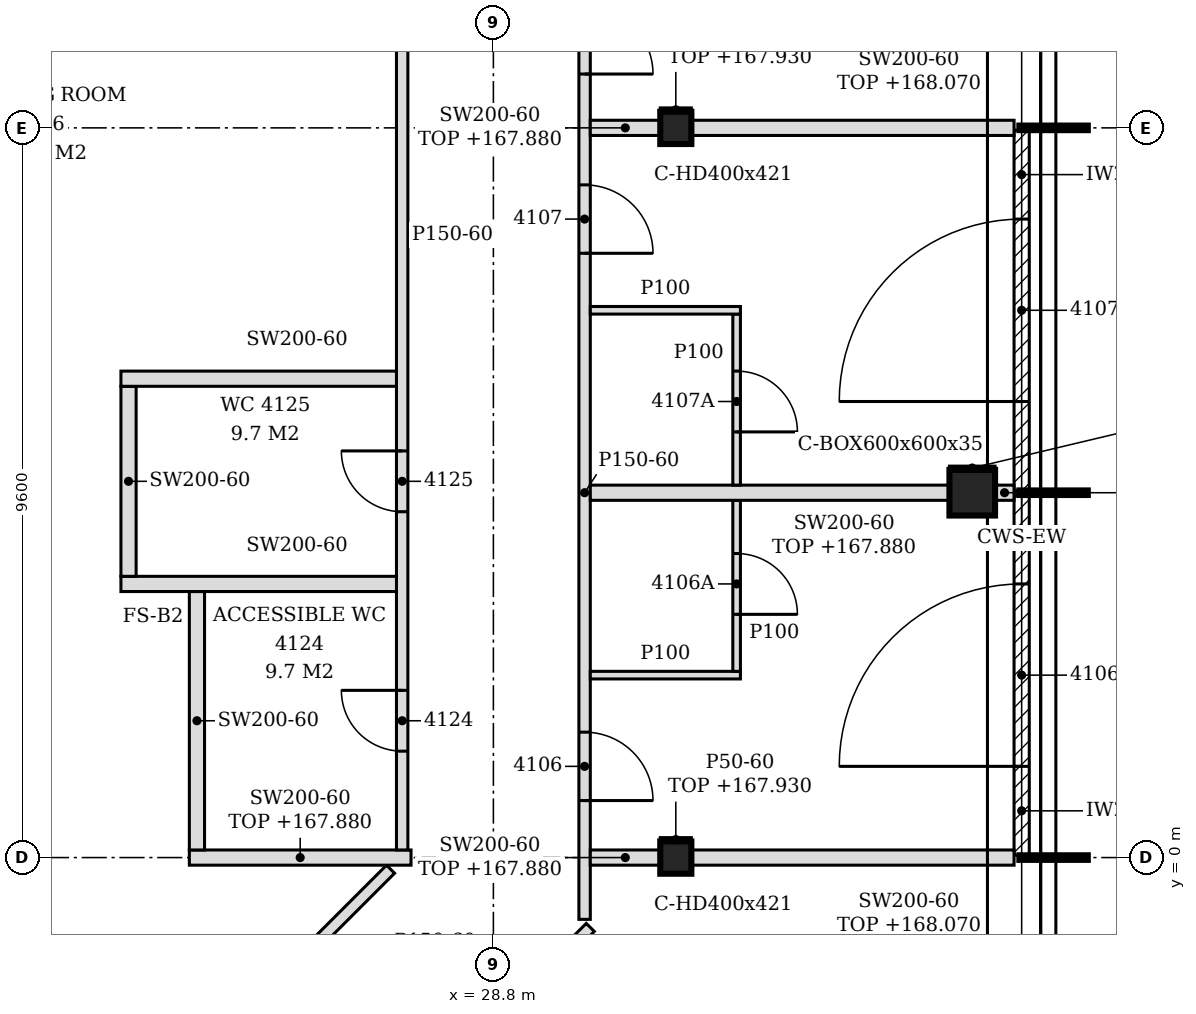
"""IFC4 building model, lengths in metres.
Left out: names, types, materials, properties, quantities, classifications, styles, units other than length and angle.
Written with IfcOpenShell. Run it as: python <this file> out.ifc"""

import sys

from ifc_helpers import new_model, si_unit, direction, frame, frame_2d, origin, origin_2d, place, context, subcontext, project, spatial, polyline, rectangle, hollow_rectangle, i_section, outline, extrude, element, fill, save


model = new_model("IFC4")
c1 = context("Model", 3, precision=1e-05, world=origin(), true_north=direction((0.0, 1.0)))
c2 = subcontext(c1, "Body", "Model", "MODEL_VIEW")
j1 = project(units=[si_unit("LENGTHUNIT", "METRE"), si_unit("PLANEANGLEUNIT", "RADIAN")], contexts=[c1])
p1 = place(None, origin())
s1 = spatial("IfcSite", under=j1, at=p1, CompositionType="ELEMENT")
p2 = place(p1, origin())
s2 = spatial("IfcBuilding", under=s1, at=p2, CompositionType="ELEMENT")
p3 = place(p2, frame((0.0, 0.0, 165.0)))
s3 = spatial("IfcBuildingStorey", under=s2, at=p3, CompositionType="ELEMENT", Elevation=165.0)
p4 = place(p3, frame((35.1, 4.8, -0.15), z_axis=(0.0, 0.0, 1.0), x_axis=(1.0, 0.0, 0.0)))
e1 = element("IfcColumn", 1, at=p4, inside=s3, PredefinedType="COLUMN", context=c2, shape_type="SweptSolid", body=[
    extrude(hollow_rectangle(XDim=0.6, YDim=0.6, WallThickness=0.035, at=origin_2d()), origin(), (0.0, 0.0, 1.0), 3.6),
])
for number, where, z_axis, x_axis in (
    (2, (31.2, 0.0, -0.15), (0.0, 0.0, 1.0), (1.0, 0.0, 0.0)),
    (3, (31.2, 9.6, -0.15), (0.0, 0.0, 1.0), (1.0, 0.0, 0.0)),
):
    element("IfcColumn", number, at=place(p3, frame(where, z_axis=z_axis, x_axis=x_axis)), inside=s3, PredefinedType="COLUMN", context=c2, shape_type="SweptSolid", body=[
        extrude(i_section(OverallWidth=0.409, OverallDepth=0.425, WebThickness=0.033, FlangeThickness=0.052, FilletRadius=0.015, at=origin_2d()), origin(), (0.0, 0.0, 1.0), 3.6),
    ])
p5 = place(p3, frame((35.75, 0.03, 0.0), z_axis=(0.0, 0.0, 1.0), x_axis=(0.0, 1.0, 0.0)))
e4 = element("IfcWall", 4, at=p5, inside=s3, PredefinedType="NOTDEFINED", context=c2, shape_type="SweptSolid", body=[
    extrude(rectangle(XDim=4.74, YDim=0.2, at=frame_2d((2.37, 0.0))), origin(), (0.0, 0.0, 1.0), 3.45),
])
p6 = place(p5, frame((1.17, 0.0, 0.0)))
e5 = element("IfcOpeningElement", 5, at=p6, cuts=e4, PredefinedType="OPENING", context=c2, shape_type="SweptSolid", body=[
    extrude(rectangle(XDim=2.4, YDim=2.4, at=frame_2d((1.2, 1.2))), frame((0.0, 0.11, 0.0), z_axis=(0.0, -1.0, 0.0), x_axis=(1.0, 0.0, 0.0)), (0.0, 0.0, 1.0), 0.22),
])
p7 = place(p3, frame((35.75, 4.83, 0.0), z_axis=(0.0, 0.0, 1.0), x_axis=(0.0, 1.0, 0.0)))
e6 = element("IfcWall", 6, at=p7, inside=s3, PredefinedType="NOTDEFINED", context=c2, shape_type="SweptSolid", body=[
    extrude(rectangle(XDim=4.74, YDim=0.2, at=frame_2d((2.37, 0.0))), origin(), (0.0, 0.0, 1.0), 3.45),
])
p8 = place(p7, frame((1.17, 0.0, 0.0)))
e7 = element("IfcOpeningElement", 7, at=p8, cuts=e6, PredefinedType="OPENING", context=c2, shape_type="SweptSolid", body=[
    extrude(rectangle(XDim=2.4, YDim=2.4, at=frame_2d((1.2, 1.2))), frame((0.0, 0.11, 0.0), z_axis=(0.0, -1.0, 0.0), x_axis=(1.0, 0.0, 0.0)), (0.0, 0.0, 1.0), 0.22),
])
p9 = place(p3, frame((22.722, -8.272, 0.0), z_axis=(0.0, 0.0, 1.0), x_axis=(0.707106781187, 0.707106781187, 0.0)))
e8 = element("IfcWall", 8, at=p9, inside=s3, PredefinedType="PARTITIONING", context=c2, shape_type="SweptSolid", body=[
    extrude(rectangle(XDim=10.399, YDim=0.15, at=frame_2d((5.199, 0.0))), origin(), (0.0, 0.0, 1.0), 2.88),
])
p10 = place(p9, frame((2.846, 0.0, 0.0)))
e9 = element("IfcOpeningElement", 9, at=p10, cuts=e8, PredefinedType="OPENING", context=c2, shape_type="SweptSolid", body=[
    extrude(rectangle(XDim=0.9, YDim=2.1, at=frame_2d((0.45, 1.05))), frame((0.0, 0.085, 0.0), z_axis=(0.0, -1.0, 0.0), x_axis=(1.0, 0.0, 0.0)), (0.0, 0.0, 1.0), 0.17),
])
p11 = place(p9, frame((6.116, 0.0, 0.0)))
e10 = element("IfcOpeningElement", 10, at=p11, cuts=e8, PredefinedType="OPENING", context=c2, shape_type="SweptSolid", body=[
    extrude(rectangle(XDim=0.9, YDim=2.1, at=frame_2d((0.45, 1.05))), frame((0.0, 0.085, 0.0), z_axis=(0.0, -1.0, 0.0), x_axis=(1.0, 0.0, 0.0)), (0.0, 0.0, 1.0), 0.17),
])
p12 = place(p3, frame((21.728, -5.872, 0.0), z_axis=(0.0, 0.0, 1.0), x_axis=(0.707106781187, 0.707106781187, 0.0)))
e11 = element("IfcWall", 11, at=p12, inside=s3, PredefinedType="PARTITIONING", context=c2, shape_type="SweptSolid", body=[
    extrude(rectangle(XDim=8.088, YDim=0.15, at=frame_2d((4.044, 0.0))), origin(), (0.0, 0.0, 1.0), 2.88),
])
p13 = place(p3, frame((30.0, -0.813, 0.0), z_axis=(0.0, 0.0, 1.0), x_axis=(0.0, 1.0, 0.0)))
e12 = element("IfcWall", 12, at=p13, inside=s3, PredefinedType="PARTITIONING", context=c2, shape_type="SweptSolid", body=[
    extrude(outline(polyline([(0.0, 0.0), (12.834, 0.0), (12.834, 3.45), (10.518, 3.45), (10.516, 2.88), (10.308, 2.88), (10.306, 3.45), (5.718, 3.45), (5.716, 2.88), (5.508, 2.88), (5.506, 3.45), (0.918, 3.45), (0.916, 2.88), (0.708, 2.88), (0.706, 3.45), (0.0, 3.45), (0.0, 0.0)])), frame((0.0, 0.075, 0.0), z_axis=(0.0, -1.0, 0.0), x_axis=(1.0, 0.0, 0.0)), (0.0, 0.0, 1.0), 0.15),
])
p14 = place(p13, frame((1.563, 0.0, 0.0)))
e13 = element("IfcOpeningElement", 13, at=p14, cuts=e12, PredefinedType="OPENING", context=c2, shape_type="SweptSolid", body=[
    extrude(rectangle(XDim=0.9, YDim=2.1, at=frame_2d((0.45, 1.05))), frame((0.0, 0.085, 0.0), z_axis=(0.0, -1.0, 0.0), x_axis=(1.0, 0.0, 0.0)), (0.0, 0.0, 1.0), 0.17),
])
p15 = place(p13, frame((8.763, 0.0, 0.0)))
e14 = element("IfcOpeningElement", 14, at=p15, cuts=e12, PredefinedType="OPENING", context=c2, shape_type="SweptSolid", body=[
    extrude(rectangle(XDim=0.9, YDim=2.1, at=frame_2d((0.45, 1.05))), frame((0.0, 0.085, 0.0), z_axis=(0.0, -1.0, 0.0), x_axis=(1.0, 0.0, 0.0)), (0.0, 0.0, 1.0), 0.17),
])
p16 = place(p13, frame((11.121, 0.0, 0.0)))
e15 = element("IfcOpeningElement", 15, at=p16, cuts=e12, PredefinedType="OPENING", context=c2, shape_type="SweptSolid", body=[
    extrude(rectangle(XDim=0.9, YDim=2.1, at=frame_2d((0.45, 1.05))), frame((0.0, 0.085, 0.0), z_axis=(0.0, -1.0, 0.0), x_axis=(1.0, 0.0, 0.0)), (0.0, 0.0, 1.0), 0.17),
])
p17 = place(p3, frame((24.8, 0.0, 0.0), z_axis=(0.0, 0.0, 1.0), x_axis=(1.0, 0.0, 0.0)))
e16 = element("IfcWall", 16, at=p17, inside=s3, PredefinedType="PARTITIONING", context=c2, shape_type="SweptSolid", body=[
    extrude(rectangle(XDim=2.916, YDim=0.2, at=frame_2d((1.458, 0.0))), origin(), (0.0, 0.0, 1.0), 2.88),
])
p18 = place(p3, frame((30.075, 0.0, 0.0), z_axis=(0.0, 0.0, 1.0), x_axis=(1.0, 0.0, 0.0)))
e17 = element("IfcWall", 17, at=p18, inside=s3, PredefinedType="PARTITIONING", context=c2, shape_type="SweptSolid", body=[
    extrude(rectangle(XDim=0.921, YDim=0.2, at=frame_2d((0.46, 0.0))), origin(), (0.0, 0.0, 1.0), 2.88),
])
p19 = place(p3, frame((31.405, 0.0, 0.0), z_axis=(0.0, 0.0, 1.0), x_axis=(1.0, 0.0, 0.0)))
e18 = element("IfcWall", 18, at=p19, inside=s3, PredefinedType="PARTITIONING", context=c2, shape_type="SweptSolid", body=[
    extrude(outline(polyline([(0.0, 0.0), (4.245, 0.0), (4.246, 3.07), (3.845, 3.07), (3.844, 2.93), (3.545, 2.93), (3.543, 3.07), (0.0, 3.07), (0.0, 0.0)])), frame((0.0, 0.1, 0.0), z_axis=(0.0, -1.0, 0.0), x_axis=(1.0, 0.0, 0.0)), (0.0, 0.0, 1.0), 0.2),
])
p20 = place(p3, frame((24.9, 0.1, 0.0), z_axis=(0.0, 0.0, 1.0), x_axis=(0.0, 1.0, 0.0)))
e19 = element("IfcWall", 19, at=p20, inside=s3, PredefinedType="PARTITIONING", context=c2, shape_type="SweptSolid", body=[
    extrude(outline(polyline([(0.0, 0.0), (3.4, 0.0), (3.4, 3.45), (0.005, 3.45), (0.003, 2.88), (0.0, 2.88), (0.0, 0.0)])), frame((0.0, 0.1, 0.0), z_axis=(0.0, -1.0, 0.0), x_axis=(1.0, 0.0, 0.0)), (0.0, 0.0, 1.0), 0.2),
])
p21 = place(p3, frame((27.6, 0.1, 0.0), z_axis=(0.0, 0.0, 1.0), x_axis=(0.0, 1.0, 0.0)))
e20 = element("IfcWall", 20, at=p21, inside=s3, PredefinedType="PARTITIONING", context=c2, shape_type="SweptSolid", body=[
    extrude(outline(polyline([(0.0, 0.0), (10.927, 0.0), (10.927, 3.45), (9.605, 3.45), (9.603, 2.88), (9.395, 2.88), (9.393, 3.45), (4.805, 3.45), (4.803, 2.88), (4.595, 2.88), (4.593, 3.45), (0.005, 3.45), (0.003, 2.88), (0.0, 2.88), (0.0, 0.0)])), frame((0.0, 0.075, 0.0), z_axis=(0.0, -1.0, 0.0), x_axis=(1.0, 0.0, 0.0)), (0.0, 0.0, 1.0), 0.15),
])
p22 = place(p21, frame((1.3, 0.0, 0.0)))
e21 = element("IfcOpeningElement", 21, at=p22, cuts=e20, PredefinedType="OPENING", context=c2, shape_type="SweptSolid", body=[
    extrude(rectangle(XDim=0.8, YDim=2.1, at=frame_2d((0.4, 1.05))), frame((0.0, 0.085, 0.0), z_axis=(0.0, -1.0, 0.0), x_axis=(1.0, 0.0, 0.0)), (0.0, 0.0, 1.0), 0.17),
])
p23 = place(p21, frame((4.45, 0.0, 0.0)))
e22 = element("IfcOpeningElement", 22, at=p23, cuts=e20, PredefinedType="OPENING", context=c2, shape_type="SweptSolid", body=[
    extrude(rectangle(XDim=0.8, YDim=2.1, at=frame_2d((0.4, 1.05))), frame((0.0, 0.085, 0.0), z_axis=(0.0, -1.0, 0.0), x_axis=(1.0, 0.0, 0.0)), (0.0, 0.0, 1.0), 0.17),
])
p24 = place(p3, frame((30.075, 2.4, 0.0), z_axis=(0.0, 0.0, 1.0), x_axis=(1.0, 0.0, 0.0)))
e23 = element("IfcWall", 23, at=p24, inside=s3, PredefinedType="PARTITIONING", context=c2, shape_type="SweptSolid", body=[
    extrude(outline(polyline([(0.0, 0.0), (1.975, 0.0), (1.975, 3.45), (1.275, 3.45), (1.273, 2.93), (0.975, 2.93), (0.973, 3.45), (0.0, 3.45), (0.0, 0.0)])), frame((0.0, 0.05, 0.0), z_axis=(0.0, -1.0, 0.0), x_axis=(1.0, 0.0, 0.0)), (0.0, 0.0, 1.0), 0.1),
])
p25 = place(p3, frame((32.0, 2.45, 0.0), z_axis=(0.0, 0.0, 1.0), x_axis=(0.0, 1.0, 0.0)))
e24 = element("IfcWall", 24, at=p25, inside=s3, PredefinedType="PARTITIONING", context=c2, shape_type="SweptSolid", body=[
    extrude(rectangle(XDim=2.25, YDim=0.1, at=frame_2d((1.125, 0.0))), origin(), (0.0, 0.0, 1.0), 3.45),
])
p26 = place(p25, frame((0.75, 0.0, 0.0)))
e25 = element("IfcOpeningElement", 25, at=p26, cuts=e24, PredefinedType="OPENING", context=c2, shape_type="SweptSolid", body=[
    extrude(rectangle(XDim=0.8, YDim=2.1, at=frame_2d((0.4, 1.05))), frame((0.0, 0.06, 0.0), z_axis=(0.0, -1.0, 0.0), x_axis=(1.0, 0.0, 0.0)), (0.0, 0.0, 1.0), 0.12),
])
p27 = place(p3, frame((23.9, 3.6, 0.0), z_axis=(0.0, 0.0, 1.0), x_axis=(1.0, 0.0, 0.0)))
e26 = element("IfcWall", 26, at=p27, inside=s3, PredefinedType="PARTITIONING", context=c2, shape_type="SweptSolid", body=[
    extrude(rectangle(XDim=3.625, YDim=0.2, at=frame_2d((1.812, 0.0))), origin(), (0.0, 0.0, 1.0), 3.45),
])
p28 = place(p3, frame((24.0, 3.7, 0.0), z_axis=(0.0, 0.0, 1.0), x_axis=(0.0, 1.0, 0.0)))
e27 = element("IfcWall", 27, at=p28, inside=s3, PredefinedType="PARTITIONING", context=c2, shape_type="SweptSolid", body=[
    extrude(outline(polyline([(0.0, 0.0), (2.5, 0.0), (2.5, 3.45), (1.205, 3.45), (1.203, 2.88), (0.995, 2.88), (0.993, 3.45), (0.0, 3.45), (0.0, 0.0)])), frame((0.0, 0.1, 0.0), z_axis=(0.0, -1.0, 0.0), x_axis=(1.0, 0.0, 0.0)), (0.0, 0.0, 1.0), 0.2),
])
p29 = place(p3, frame((30.075, 4.8, 0.0), z_axis=(0.0, 0.0, 1.0), x_axis=(1.0, 0.0, 0.0)))
e28 = element("IfcWall", 28, at=p29, inside=s3, PredefinedType="PARTITIONING", context=c2, shape_type="SweptSolid", body=[
    extrude(rectangle(XDim=4.725, YDim=0.2, at=frame_2d((2.363, 0.0))), origin(), (0.0, 0.0, 1.0), 2.88),
])
p30 = place(p3, frame((35.4, 4.8, 0.0), z_axis=(0.0, 0.0, 1.0), x_axis=(1.0, 0.0, 0.0)))
e29 = element("IfcWall", 29, at=p30, inside=s3, PredefinedType="PARTITIONING", context=c2, shape_type="SweptSolid", body=[
    extrude(rectangle(XDim=0.25, YDim=0.2, at=frame_2d((0.125, 0.0))), origin(), (0.0, 0.0, 1.0), 3.45),
])
p31 = place(p3, frame((32.0, 4.9, 0.0), z_axis=(0.0, 0.0, 1.0), x_axis=(0.0, 1.0, 0.0)))
e30 = element("IfcWall", 30, at=p31, inside=s3, PredefinedType="PARTITIONING", context=c2, shape_type="SweptSolid", body=[
    extrude(rectangle(XDim=2.25, YDim=0.1, at=frame_2d((1.125, 0.0))), origin(), (0.0, 0.0, 1.0), 3.45),
])
p32 = place(p31, frame((0.7, 0.0, 0.0)))
e31 = element("IfcOpeningElement", 31, at=p32, cuts=e30, PredefinedType="OPENING", context=c2, shape_type="SweptSolid", body=[
    extrude(rectangle(XDim=0.8, YDim=2.1, at=frame_2d((0.4, 1.05))), frame((0.0, 0.06, 0.0), z_axis=(0.0, -1.0, 0.0), x_axis=(1.0, 0.0, 0.0)), (0.0, 0.0, 1.0), 0.12),
])
p33 = place(p3, frame((23.9, 6.3, 0.0), z_axis=(0.0, 0.0, 1.0), x_axis=(1.0, 0.0, 0.0)))
e32 = element("IfcWall", 32, at=p33, inside=s3, PredefinedType="PARTITIONING", context=c2, shape_type="SweptSolid", body=[
    extrude(rectangle(XDim=3.625, YDim=0.2, at=frame_2d((1.812, 0.0))), origin(), (0.0, 0.0, 1.0), 3.45),
])
p34 = place(p3, frame((30.075, 7.2, 0.0), z_axis=(0.0, 0.0, 1.0), x_axis=(1.0, 0.0, 0.0)))
e33 = element("IfcWall", 33, at=p34, inside=s3, PredefinedType="PARTITIONING", context=c2, shape_type="SweptSolid", body=[
    extrude(outline(polyline([(0.0, 0.0), (1.975, 0.0), (1.975, 3.45), (1.275, 3.45), (1.273, 2.93), (0.975, 2.93), (0.973, 3.45), (0.0, 3.45), (0.0, 0.0)])), frame((0.0, 0.05, 0.0), z_axis=(0.0, -1.0, 0.0), x_axis=(1.0, 0.0, 0.0)), (0.0, 0.0, 1.0), 0.1),
])
p35 = place(p3, frame((30.075, 9.6, 0.0), z_axis=(0.0, 0.0, 1.0), x_axis=(1.0, 0.0, 0.0)))
e34 = element("IfcWall", 34, at=p35, inside=s3, PredefinedType="PARTITIONING", context=c2, shape_type="SweptSolid", body=[
    extrude(rectangle(XDim=0.921, YDim=0.2, at=frame_2d((0.46, 0.0))), origin(), (0.0, 0.0, 1.0), 2.88),
])
p36 = place(p3, frame((31.405, 9.6, 0.0), z_axis=(0.0, 0.0, 1.0), x_axis=(1.0, 0.0, 0.0)))
e35 = element("IfcWall", 35, at=p36, inside=s3, PredefinedType="PARTITIONING", context=c2, shape_type="SweptSolid", body=[
    extrude(outline(polyline([(0.0, 0.0), (4.245, 0.0), (4.246, 3.07), (3.845, 3.07), (3.844, 2.93), (3.545, 2.93), (3.543, 3.07), (0.0, 3.07), (0.0, 0.0)])), frame((0.0, 0.1, 0.0), z_axis=(0.0, -1.0, 0.0), x_axis=(1.0, 0.0, 0.0)), (0.0, 0.0, 1.0), 0.2),
])
p37 = place(p3, frame((30.996, 0.238, 0.0), z_axis=(0.0, 0.0, 1.0), x_axis=(1.0, 0.0, 0.0)))
e36 = element("IfcWall", 36, at=p37, inside=s3, PredefinedType="PARTITIONING", context=c2, shape_type="SweptSolid", body=[
    extrude(rectangle(XDim=0.409, YDim=0.05, at=frame_2d((0.205, 0.0))), origin(), (0.0, 0.0, 1.0), 2.93),
])
p38 = place(p3, frame((34.8, 5.125, 0.0), z_axis=(0.0, 0.0, 1.0), x_axis=(1.0, 0.0, 0.0)))
e37 = element("IfcWall", 37, at=p38, inside=s3, PredefinedType="PARTITIONING", context=c2, shape_type="SweptSolid", body=[
    extrude(rectangle(XDim=0.6, YDim=0.05, at=frame_2d((0.3, 0.0))), origin(), (0.0, 0.0, 1.0), 2.93),
])
p39 = place(p3, frame((30.996, 9.837, 0.0), z_axis=(0.0, 0.0, 1.0), x_axis=(1.0, 0.0, 0.0)))
e38 = element("IfcWall", 38, at=p39, inside=s3, PredefinedType="PARTITIONING", context=c2, shape_type="SweptSolid", body=[
    extrude(rectangle(XDim=0.409, YDim=0.05, at=frame_2d((0.205, 0.0))), origin(), (0.0, 0.0, 1.0), 2.93),
])
p40 = place(p6, origin())
e39 = element("IfcDoor", 39, at=p40, inside=s3, OperationType="SINGLE_SWING_LEFT", PredefinedType="DOOR", context=c2, shape_type="SweptSolid", body=[
    extrude(rectangle(XDim=2.4, YDim=2.4, at=frame_2d((1.2, 1.2))), frame((0.0, 0.025, 0.0), z_axis=(0.0, -1.0, 0.0), x_axis=(1.0, 0.0, 0.0)), (0.0, 0.0, 1.0), 0.05),
])
fill(e5, e39)
p41 = place(p8, origin())
e40 = element("IfcDoor", 40, at=p41, inside=s3, OperationType="SINGLE_SWING_LEFT", PredefinedType="DOOR", context=c2, shape_type="SweptSolid", body=[
    extrude(rectangle(XDim=2.4, YDim=2.4, at=frame_2d((1.2, 1.2))), frame((0.0, 0.025, 0.0), z_axis=(0.0, -1.0, 0.0), x_axis=(1.0, 0.0, 0.0)), (0.0, 0.0, 1.0), 0.05),
])
fill(e7, e40)
p42 = place(p14, frame((0.9, 0.0, 0.0), z_axis=(0.0, 0.0, 1.0), x_axis=(-1.0, 0.0, 0.0)))
e41 = element("IfcDoor", 41, at=p42, inside=s3, OperationType="SINGLE_SWING_RIGHT", PredefinedType="DOOR", context=c2, shape_type="SweptSolid", body=[
    extrude(rectangle(XDim=0.9, YDim=2.1, at=frame_2d((0.45, 1.05))), frame((0.0, 0.025, 0.0), z_axis=(0.0, -1.0, 0.0), x_axis=(1.0, 0.0, 0.0)), (0.0, 0.0, 1.0), 0.05),
])
fill(e13, e41)
p43 = place(p26, frame((0.8, 0.0, 0.0), z_axis=(0.0, 0.0, 1.0), x_axis=(-1.0, 0.0, 0.0)))
e42 = element("IfcDoor", 42, at=p43, inside=s3, OperationType="SINGLE_SWING_RIGHT", PredefinedType="DOOR", context=c2, shape_type="SweptSolid", body=[
    extrude(rectangle(XDim=0.8, YDim=2.1, at=frame_2d((0.4, 1.05))), frame((0.0, 0.025, 0.0), z_axis=(0.0, -1.0, 0.0), x_axis=(1.0, 0.0, 0.0)), (0.0, 0.0, 1.0), 0.05),
])
fill(e25, e42)
p44 = place(p15, frame((0.9, 0.0, 0.0), z_axis=(0.0, 0.0, 1.0), x_axis=(-1.0, 0.0, 0.0)))
e43 = element("IfcDoor", 43, at=p44, inside=s3, OperationType="SINGLE_SWING_RIGHT", PredefinedType="DOOR", context=c2, shape_type="SweptSolid", body=[
    extrude(rectangle(XDim=0.9, YDim=2.1, at=frame_2d((0.45, 1.05))), frame((0.0, 0.025, 0.0), z_axis=(0.0, -1.0, 0.0), x_axis=(1.0, 0.0, 0.0)), (0.0, 0.0, 1.0), 0.05),
])
fill(e14, e43)
p45 = place(p32, frame((0.8, 0.0, 0.0), z_axis=(0.0, 0.0, 1.0), x_axis=(-1.0, 0.0, 0.0)))
e44 = element("IfcDoor", 44, at=p45, inside=s3, OperationType="SINGLE_SWING_RIGHT", PredefinedType="DOOR", context=c2, shape_type="SweptSolid", body=[
    extrude(rectangle(XDim=0.8, YDim=2.1, at=frame_2d((0.4, 1.05))), frame((0.0, 0.025, 0.0), z_axis=(0.0, -1.0, 0.0), x_axis=(1.0, 0.0, 0.0)), (0.0, 0.0, 1.0), 0.05),
])
fill(e31, e44)
p46 = place(p16, frame((0.9, 0.0, 0.0), z_axis=(0.0, 0.0, 1.0), x_axis=(-1.0, 0.0, 0.0)))
e45 = element("IfcDoor", 45, at=p46, inside=s3, OperationType="SINGLE_SWING_RIGHT", PredefinedType="DOOR", context=c2, shape_type="SweptSolid", body=[
    extrude(rectangle(XDim=0.9, YDim=2.1, at=frame_2d((0.45, 1.05))), frame((0.0, 0.025, 0.0), z_axis=(0.0, -1.0, 0.0), x_axis=(1.0, 0.0, 0.0)), (0.0, 0.0, 1.0), 0.05),
])
fill(e15, e45)
p47 = place(p22, origin())
e46 = element("IfcDoor", 46, at=p47, inside=s3, OperationType="SINGLE_SWING_RIGHT", PredefinedType="DOOR", context=c2, shape_type="SweptSolid", body=[
    extrude(rectangle(XDim=0.8, YDim=2.1, at=frame_2d((0.4, 1.05))), frame((0.0, 0.025, 0.0), z_axis=(0.0, -1.0, 0.0), x_axis=(1.0, 0.0, 0.0)), (0.0, 0.0, 1.0), 0.05),
])
fill(e21, e46)
p48 = place(p23, origin())
e47 = element("IfcDoor", 47, at=p48, inside=s3, OperationType="SINGLE_SWING_RIGHT", PredefinedType="DOOR", context=c2, shape_type="SweptSolid", body=[
    extrude(rectangle(XDim=0.8, YDim=2.1, at=frame_2d((0.4, 1.05))), frame((0.0, 0.025, 0.0), z_axis=(0.0, -1.0, 0.0), x_axis=(1.0, 0.0, 0.0)), (0.0, 0.0, 1.0), 0.05),
])
fill(e22, e47)
save(model, sys.argv[1])
